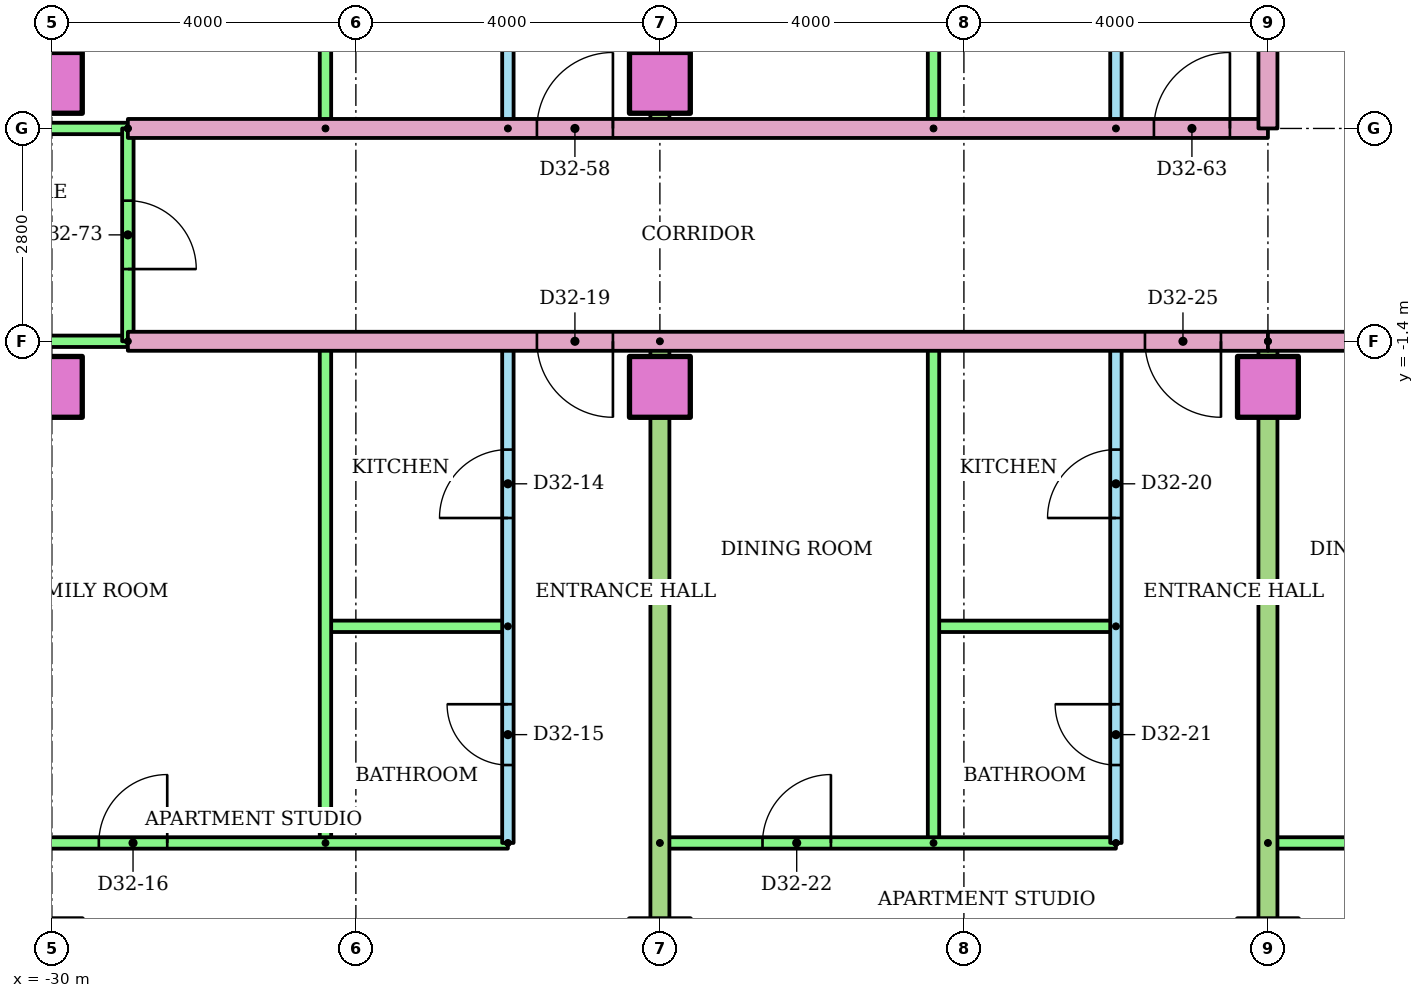
"""IFC4 building model, lengths in metres.
Left out: names, types, materials, properties, quantities, classifications, styles, units other than length and angle.
Written with IfcOpenShell. Run it as: python <this file> out.ifc"""

import sys

from ifc_helpers import new_model, si_unit, direction, frame, frame_2d, origin, origin_2d, place, context, subcontext, project, spatial, rectangle, extrude, element, fill, save


model = new_model("IFC4")
c1 = context("Model", 3, precision=1e-05, world=origin(), true_north=direction((0.0, 1.0)))
c2 = subcontext(c1, "Body", "Model", "MODEL_VIEW")
j1 = project(units=[si_unit("LENGTHUNIT", "METRE"), si_unit("PLANEANGLEUNIT", "RADIAN")], contexts=[c1])
p1 = place(None, origin())
s1 = spatial("IfcSite", under=j1, at=p1, CompositionType="ELEMENT")
p2 = place(p1, origin())
s2 = spatial("IfcBuilding", under=s1, at=p2, CompositionType="ELEMENT")
p3 = place(p2, frame((0.0, 0.0, 126.2)))
s3 = spatial("IfcBuildingStorey", under=s2, at=p3, CompositionType="ELEMENT", Elevation=126.2)
for number, where in (
    (1, (-30.0, -9.4, 0.0)),
    (2, (-22.0, -9.4, 0.0)),
    (3, (-14.0, -9.4, 0.0)),
    (4, (-30.0, -2.0, 0.0)),
    (5, (-22.0, -2.0, 0.0)),
    (6, (-14.0, -2.0, 0.0)),
    (7, (-30.0, 2.0, 0.0)),
    (8, (-22.0, 2.0, 0.0)),
):
    element("IfcColumn", number, at=place(p3, frame(where)), inside=s3, PredefinedType="COLUMN", context=c2, shape_type="SweptSolid", body=[
        extrude(rectangle(XDim=0.8, YDim=0.8, at=origin_2d()), origin(), (0.0, 0.0, 1.0), 3.2),
    ])
p4 = place(p3, frame((-24.0, -8.0, 0.0), z_axis=(0.0, 0.0, 1.0), x_axis=(0.0, 1.0, 0.0)))
e9 = element("IfcWall", 9, at=p4, inside=s3, PredefinedType="PARTITIONING", context=c2, shape_type="SweptSolid", body=[
    extrude(rectangle(XDim=6.6, YDim=0.15, at=frame_2d((3.3, 0.0))), origin(), (0.0, 0.0, 1.0), 2.4),
])
p5 = place(p4, frame((4.275, 0.0, 0.0)))
e10 = element("IfcOpeningElement", 10, at=p5, cuts=e9, PredefinedType="OPENING", context=c2, shape_type="SweptSolid", body=[
    extrude(rectangle(XDim=0.9, YDim=2.1, at=frame_2d((0.45, 1.05))), frame((0.0, 0.085, 0.0), z_axis=(0.0, -1.0, 0.0), x_axis=(1.0, 0.0, 0.0)), (0.0, 0.0, 1.0), 0.17),
])
p6 = place(p4, frame((1.025, 0.0, 0.0)))
e11 = element("IfcOpeningElement", 11, at=p6, cuts=e9, PredefinedType="OPENING", context=c2, shape_type="SweptSolid", body=[
    extrude(rectangle(XDim=0.8, YDim=2.1, at=frame_2d((0.4, 1.05))), frame((0.0, 0.085, 0.0), z_axis=(0.0, -1.0, 0.0), x_axis=(1.0, 0.0, 0.0)), (0.0, 0.0, 1.0), 0.17),
])
p7 = place(p3, frame((-24.0, -5.15, 0.0), z_axis=(0.0, 0.0, 1.0), x_axis=(-1.0, 0.0, 0.0)))
e12 = element("IfcWall", 12, at=p7, inside=s3, PredefinedType="PARTITIONING", context=c2, shape_type="SweptSolid", body=[
    extrude(rectangle(XDim=2.4, YDim=0.15, at=frame_2d((1.2, 0.0))), origin(), (0.0, 0.0, 1.0), 2.4),
])
p8 = place(p3, frame((-26.4, -8.0, 0.0), z_axis=(0.0, 0.0, 1.0), x_axis=(0.0, 1.0, 0.0)))
e13 = element("IfcWall", 13, at=p8, inside=s3, PredefinedType="PARTITIONING", context=c2, shape_type="SweptSolid", body=[
    extrude(rectangle(XDim=6.6, YDim=0.15, at=frame_2d((3.3, 0.0))), origin(), (0.0, 0.0, 1.0), 2.4),
])
p9 = place(p3, frame((-32.71, -8.0, 0.0)))
e14 = element("IfcWall", 14, at=p9, inside=s3, PredefinedType="PARTITIONING", context=c2, shape_type="SweptSolid", body=[
    extrude(rectangle(XDim=8.71, YDim=0.15, at=frame_2d((4.355, 0.0))), origin(), (0.0, 0.0, 1.0), 2.4),
])
p10 = place(p9, frame((3.328, 0.0, 0.0)))
e15 = element("IfcOpeningElement", 15, at=p10, cuts=e14, PredefinedType="OPENING", context=c2, shape_type="SweptSolid", body=[
    extrude(rectangle(XDim=0.9, YDim=2.1, at=frame_2d((0.45, 1.05))), frame((0.0, 0.085, 0.0), z_axis=(0.0, -1.0, 0.0), x_axis=(1.0, 0.0, 0.0)), (0.0, 0.0, 1.0), 0.17),
])
p11 = place(p3, frame((-16.0, -8.0, 0.0), z_axis=(0.0, 0.0, 1.0), x_axis=(0.0, 1.0, 0.0)))
e16 = element("IfcWall", 16, at=p11, inside=s3, PredefinedType="PARTITIONING", context=c2, shape_type="SweptSolid", body=[
    extrude(rectangle(XDim=6.6, YDim=0.15, at=frame_2d((3.3, 0.0))), origin(), (0.0, 0.0, 1.0), 2.4),
])
p12 = place(p11, frame((4.275, 0.0, 0.0)))
e17 = element("IfcOpeningElement", 17, at=p12, cuts=e16, PredefinedType="OPENING", context=c2, shape_type="SweptSolid", body=[
    extrude(rectangle(XDim=0.9, YDim=2.1, at=frame_2d((0.45, 1.05))), frame((0.0, 0.085, 0.0), z_axis=(0.0, -1.0, 0.0), x_axis=(1.0, 0.0, 0.0)), (0.0, 0.0, 1.0), 0.17),
])
p13 = place(p11, frame((1.025, 0.0, 0.0)))
e18 = element("IfcOpeningElement", 18, at=p13, cuts=e16, PredefinedType="OPENING", context=c2, shape_type="SweptSolid", body=[
    extrude(rectangle(XDim=0.8, YDim=2.1, at=frame_2d((0.4, 1.05))), frame((0.0, 0.085, 0.0), z_axis=(0.0, -1.0, 0.0), x_axis=(1.0, 0.0, 0.0)), (0.0, 0.0, 1.0), 0.17),
])
p14 = place(p3, frame((-16.0, -5.15, 0.0), z_axis=(0.0, 0.0, 1.0), x_axis=(-1.0, 0.0, 0.0)))
e19 = element("IfcWall", 19, at=p14, inside=s3, PredefinedType="PARTITIONING", context=c2, shape_type="SweptSolid", body=[
    extrude(rectangle(XDim=2.4, YDim=0.15, at=frame_2d((1.2, 0.0))), origin(), (0.0, 0.0, 1.0), 2.4),
])
p15 = place(p3, frame((-18.4, -8.0, 0.0), z_axis=(0.0, 0.0, 1.0), x_axis=(0.0, 1.0, 0.0)))
e20 = element("IfcWall", 20, at=p15, inside=s3, PredefinedType="PARTITIONING", context=c2, shape_type="SweptSolid", body=[
    extrude(rectangle(XDim=6.6, YDim=0.15, at=frame_2d((3.3, 0.0))), origin(), (0.0, 0.0, 1.0), 2.4),
])
p16 = place(p3, frame((-22.0, -8.0, 0.0)))
e21 = element("IfcWall", 21, at=p16, inside=s3, PredefinedType="PARTITIONING", context=c2, shape_type="SweptSolid", body=[
    extrude(rectangle(XDim=6.0, YDim=0.15, at=frame_2d((3.0, 0.0))), origin(), (0.0, 0.0, 1.0), 2.4),
])
p17 = place(p16, frame((1.35, 0.0, 0.0)))
e22 = element("IfcOpeningElement", 22, at=p17, cuts=e21, PredefinedType="OPENING", context=c2, shape_type="SweptSolid", body=[
    extrude(rectangle(XDim=0.9, YDim=2.1, at=frame_2d((0.45, 1.05))), frame((0.0, 0.085, 0.0), z_axis=(0.0, -1.0, 0.0), x_axis=(1.0, 0.0, 0.0)), (0.0, 0.0, 1.0), 0.17),
])
p18 = place(p3, frame((-22.0, -1.4, 0.0), z_axis=(0.0, 0.0, 1.0), x_axis=(0.0, -1.0, 0.0)))
e23 = element("IfcWall", 23, at=p18, inside=s3, PredefinedType="PARTITIONING", context=c2, shape_type="SweptSolid", body=[
    extrude(rectangle(XDim=14.91, YDim=0.25, at=frame_2d((7.455, 0.0))), origin(), (0.0, 0.0, 1.0), 2.4),
])
p19 = place(p3, frame((-14.0, -8.0, 0.0)))
e24 = element("IfcWall", 24, at=p19, inside=s3, PredefinedType="PARTITIONING", context=c2, shape_type="SweptSolid", body=[
    extrude(rectangle(XDim=14.0, YDim=0.15, at=frame_2d((7.0, 0.0))), origin(), (0.0, 0.0, 1.0), 2.4),
])
p20 = place(p19, frame((8.775, 0.0, 0.0)))
e25 = element("IfcOpeningElement", 25, at=p20, cuts=e24, PredefinedType="OPENING", context=c2, shape_type="SweptSolid", body=[
    extrude(rectangle(XDim=0.9, YDim=2.1, at=frame_2d((0.45, 1.05))), frame((0.0, 0.085, 0.0), z_axis=(0.0, -1.0, 0.0), x_axis=(1.0, 0.0, 0.0)), (0.0, 0.0, 1.0), 0.17),
])
p21 = place(p19, frame((4.525, 0.0, 0.0)))
e26 = element("IfcOpeningElement", 26, at=p21, cuts=e24, PredefinedType="OPENING", context=c2, shape_type="SweptSolid", body=[
    extrude(rectangle(XDim=0.9, YDim=2.1, at=frame_2d((0.45, 1.05))), frame((0.0, 0.085, 0.0), z_axis=(0.0, -1.0, 0.0), x_axis=(1.0, 0.0, 0.0)), (0.0, 0.0, 1.0), 0.17),
])
p22 = place(p19, frame((1.1, 0.0, 0.0)))
e27 = element("IfcOpeningElement", 27, at=p22, cuts=e24, PredefinedType="OPENING", context=c2, shape_type="SweptSolid", body=[
    extrude(rectangle(XDim=0.9, YDim=2.1, at=frame_2d((0.45, 1.05))), frame((0.0, 0.085, 0.0), z_axis=(0.0, -1.0, 0.0), x_axis=(1.0, 0.0, 0.0)), (0.0, 0.0, 1.0), 0.17),
])
p23 = place(p3, frame((-14.0, -1.4, 0.0), z_axis=(0.0, 0.0, 1.0), x_axis=(0.0, -1.0, 0.0)))
e28 = element("IfcWall", 28, at=p23, inside=s3, PredefinedType="PARTITIONING", context=c2, shape_type="SweptSolid", body=[
    extrude(rectangle(XDim=14.91, YDim=0.25, at=frame_2d((7.455, 0.0))), origin(), (0.0, 0.0, 1.0), 2.4),
])
p24 = place(p3, frame((-14.0, -1.4, 0.0), z_axis=(0.0, 0.0, 1.0), x_axis=(-1.0, 0.0, 0.0)))
e29 = element("IfcWall", 29, at=p24, inside=s3, PredefinedType="PARTITIONING", context=c2, shape_type="SweptSolid", body=[
    extrude(rectangle(XDim=15.0, YDim=0.25, at=frame_2d((7.5, 0.0))), origin(), (0.0, 0.0, 1.0), 2.4),
])
p25 = place(p24, frame((8.618, 0.0, 0.0)))
e30 = element("IfcOpeningElement", 30, at=p25, cuts=e29, PredefinedType="OPENING", context=c2, shape_type="SweptSolid", body=[
    extrude(rectangle(XDim=1.0, YDim=2.1, at=frame_2d((0.5, 1.05))), frame((0.0, 0.135, 0.0), z_axis=(0.0, -1.0, 0.0), x_axis=(1.0, 0.0, 0.0)), (0.0, 0.0, 1.0), 0.27),
])
p26 = place(p24, frame((0.618, 0.0, 0.0)))
e31 = element("IfcOpeningElement", 31, at=p26, cuts=e29, PredefinedType="OPENING", context=c2, shape_type="SweptSolid", body=[
    extrude(rectangle(XDim=1.0, YDim=2.1, at=frame_2d((0.5, 1.05))), frame((0.0, 0.135, 0.0), z_axis=(0.0, -1.0, 0.0), x_axis=(1.0, 0.0, 0.0)), (0.0, 0.0, 1.0), 0.27),
])
p27 = place(p3, frame((-29.0, -1.4, 0.0), z_axis=(0.0, 0.0, 1.0), x_axis=(-1.0, 0.0, 0.0)))
e32 = element("IfcWall", 32, at=p27, inside=s3, PredefinedType="PARTITIONING", context=c2, shape_type="SweptSolid", body=[
    extrude(rectangle(XDim=3.72, YDim=0.15, at=frame_2d((1.86, 0.0))), origin(), (0.0, 0.0, 1.0), 2.4),
])
p28 = place(p3, frame((-24.0, 1.4, 0.0), z_axis=(0.0, 0.0, 1.0), x_axis=(0.0, 1.0, 0.0)))
e33 = element("IfcWall", 33, at=p28, inside=s3, PredefinedType="PARTITIONING", context=c2, shape_type="SweptSolid", body=[
    extrude(rectangle(XDim=9.0, YDim=0.15, at=frame_2d((4.5, 0.0))), origin(), (0.0, 0.0, 1.0), 2.4),
])
p29 = place(p28, frame((2.05, 0.0, 0.0)))
e34 = element("IfcOpeningElement", 34, at=p29, cuts=e33, PredefinedType="OPENING", context=c2, shape_type="SweptSolid", body=[
    extrude(rectangle(XDim=0.9, YDim=2.1, at=frame_2d((0.45, 1.05))), frame((0.0, 0.085, 0.0), z_axis=(0.0, -1.0, 0.0), x_axis=(1.0, 0.0, 0.0)), (0.0, 0.0, 1.0), 0.17),
])
p30 = place(p28, frame((6.6, 0.0, 0.0)))
e35 = element("IfcOpeningElement", 35, at=p30, cuts=e33, PredefinedType="OPENING", context=c2, shape_type="SweptSolid", body=[
    extrude(rectangle(XDim=0.8, YDim=2.1, at=frame_2d((0.4, 1.05))), frame((0.0, 0.085, 0.0), z_axis=(0.0, -1.0, 0.0), x_axis=(1.0, 0.0, 0.0)), (0.0, 0.0, 1.0), 0.17),
])
p31 = place(p3, frame((-26.4, 1.4, 0.0), z_axis=(0.0, 0.0, 1.0), x_axis=(0.0, 1.0, 0.0)))
e36 = element("IfcWall", 36, at=p31, inside=s3, PredefinedType="PARTITIONING", context=c2, shape_type="SweptSolid", body=[
    extrude(rectangle(XDim=9.0, YDim=0.15, at=frame_2d((4.5, 0.0))), origin(), (0.0, 0.0, 1.0), 2.4),
])
p32 = place(p3, frame((-16.0, 1.4, 0.0), z_axis=(0.0, 0.0, 1.0), x_axis=(0.0, 1.0, 0.0)))
e37 = element("IfcWall", 37, at=p32, inside=s3, PredefinedType="PARTITIONING", context=c2, shape_type="SweptSolid", body=[
    extrude(rectangle(XDim=9.0, YDim=0.15, at=frame_2d((4.5, 0.0))), origin(), (0.0, 0.0, 1.0), 2.4),
])
p33 = place(p32, frame((2.05, 0.0, 0.0)))
e38 = element("IfcOpeningElement", 38, at=p33, cuts=e37, PredefinedType="OPENING", context=c2, shape_type="SweptSolid", body=[
    extrude(rectangle(XDim=0.9, YDim=2.1, at=frame_2d((0.45, 1.05))), frame((0.0, 0.085, 0.0), z_axis=(0.0, -1.0, 0.0), x_axis=(1.0, 0.0, 0.0)), (0.0, 0.0, 1.0), 0.17),
])
p34 = place(p32, frame((6.6, 0.0, 0.0)))
e39 = element("IfcOpeningElement", 39, at=p34, cuts=e37, PredefinedType="OPENING", context=c2, shape_type="SweptSolid", body=[
    extrude(rectangle(XDim=0.8, YDim=2.1, at=frame_2d((0.4, 1.05))), frame((0.0, 0.085, 0.0), z_axis=(0.0, -1.0, 0.0), x_axis=(1.0, 0.0, 0.0)), (0.0, 0.0, 1.0), 0.17),
])
p35 = place(p3, frame((-18.4, 1.4, 0.0), z_axis=(0.0, 0.0, 1.0), x_axis=(0.0, 1.0, 0.0)))
e40 = element("IfcWall", 40, at=p35, inside=s3, PredefinedType="PARTITIONING", context=c2, shape_type="SweptSolid", body=[
    extrude(rectangle(XDim=9.0, YDim=0.15, at=frame_2d((4.5, 0.0))), origin(), (0.0, 0.0, 1.0), 2.4),
])
p36 = place(p3, frame((-22.0, 18.721, 0.0), z_axis=(0.0, 0.0, 1.0), x_axis=(0.0, -1.0, 0.0)))
e41 = element("IfcWall", 41, at=p36, inside=s3, PredefinedType="PARTITIONING", context=c2, shape_type="SweptSolid", body=[
    extrude(rectangle(XDim=17.321, YDim=0.25, at=frame_2d((8.661, 0.0))), origin(), (0.0, 0.0, 1.0), 2.4),
])
p37 = place(p3, frame((-29.0, 1.4, 0.0)))
e42 = element("IfcWall", 42, at=p37, inside=s3, PredefinedType="PARTITIONING", context=c2, shape_type="SweptSolid", body=[
    extrude(rectangle(XDim=15.0, YDim=0.25, at=frame_2d((7.5, 0.0))), origin(), (0.0, 0.0, 1.0), 2.4),
])
p38 = place(p37, frame((5.382, 0.0, 0.0)))
e43 = element("IfcOpeningElement", 43, at=p38, cuts=e42, PredefinedType="OPENING", context=c2, shape_type="SweptSolid", body=[
    extrude(rectangle(XDim=1.0, YDim=2.1, at=frame_2d((0.5, 1.05))), frame((0.0, 0.135, 0.0), z_axis=(0.0, -1.0, 0.0), x_axis=(1.0, 0.0, 0.0)), (0.0, 0.0, 1.0), 0.27),
])
p39 = place(p37, frame((13.5, 0.0, 0.0)))
e44 = element("IfcOpeningElement", 44, at=p39, cuts=e42, PredefinedType="OPENING", context=c2, shape_type="SweptSolid", body=[
    extrude(rectangle(XDim=1.0, YDim=2.1, at=frame_2d((0.5, 1.05))), frame((0.0, 0.135, 0.0), z_axis=(0.0, -1.0, 0.0), x_axis=(1.0, 0.0, 0.0)), (0.0, 0.0, 1.0), 0.27),
])
p40 = place(p3, frame((-32.72, 1.4, 0.0)))
e45 = element("IfcWall", 45, at=p40, inside=s3, PredefinedType="PARTITIONING", context=c2, shape_type="SweptSolid", body=[
    extrude(rectangle(XDim=3.72, YDim=0.15, at=frame_2d((1.86, 0.0))), origin(), (0.0, 0.0, 1.0), 2.4),
])
p41 = place(p3, frame((-29.0, 1.4, 0.0), z_axis=(0.0, 0.0, 1.0), x_axis=(0.0, -1.0, 0.0)))
e46 = element("IfcWall", 46, at=p41, inside=s3, PredefinedType="PARTITIONING", context=c2, shape_type="SweptSolid", body=[
    extrude(rectangle(XDim=2.8, YDim=0.15, at=frame_2d((1.4, 0.0))), origin(), (0.0, 0.0, 1.0), 2.4),
])
p42 = place(p41, frame((0.95, 0.0, 0.0)))
e47 = element("IfcOpeningElement", 47, at=p42, cuts=e46, PredefinedType="OPENING", context=c2, shape_type="SweptSolid", body=[
    extrude(rectangle(XDim=0.9, YDim=2.1, at=frame_2d((0.45, 1.05))), frame((0.0, 0.085, 0.0), z_axis=(0.0, -1.0, 0.0), x_axis=(1.0, 0.0, 0.0)), (0.0, 0.0, 1.0), 0.17),
])
p43 = place(p3, frame((14.0, -1.4, 0.0), z_axis=(0.0, 0.0, 1.0), x_axis=(-1.0, 0.0, 0.0)))
e48 = element("IfcWall", 48, at=p43, inside=s3, PredefinedType="PARTITIONING", context=c2, shape_type="SweptSolid", body=[
    extrude(rectangle(XDim=28.0, YDim=0.25, at=frame_2d((14.0, 0.0))), origin(), (0.0, 0.0, 1.0), 2.4),
])
p44 = place(p43, frame((12.618, 0.0, 0.0)))
e49 = element("IfcOpeningElement", 49, at=p44, cuts=e48, PredefinedType="OPENING", context=c2, shape_type="SweptSolid", body=[
    extrude(rectangle(XDim=1.0, YDim=2.1, at=frame_2d((0.5, 1.05))), frame((0.0, 0.135, 0.0), z_axis=(0.0, -1.0, 0.0), x_axis=(1.0, 0.0, 0.0)), (0.0, 0.0, 1.0), 0.27),
])
p45 = place(p43, frame((10.382, 0.0, 0.0)))
e50 = element("IfcOpeningElement", 50, at=p45, cuts=e48, PredefinedType="OPENING", context=c2, shape_type="SweptSolid", body=[
    extrude(rectangle(XDim=1.0, YDim=2.1, at=frame_2d((0.5, 1.05))), frame((0.0, 0.135, 0.0), z_axis=(0.0, -1.0, 0.0), x_axis=(1.0, 0.0, 0.0)), (0.0, 0.0, 1.0), 0.27),
])
p46 = place(p3, frame((-14.0, 3.0, 0.0), z_axis=(0.0, 0.0, 1.0), x_axis=(0.0, -1.0, 0.0)))
e51 = element("IfcWall", 51, at=p46, inside=s3, PredefinedType="PARTITIONING", context=c2, shape_type="SweptSolid", body=[
    extrude(rectangle(XDim=1.6, YDim=0.25, at=frame_2d((0.8, 0.0))), origin(), (0.0, 0.0, 1.0), 2.4),
])
p47 = place(p5, origin())
e52 = element("IfcDoor", 52, at=p47, inside=s3, OperationType="SINGLE_SWING_LEFT", PredefinedType="DOOR", context=c2, shape_type="SweptSolid", body=[
    extrude(rectangle(XDim=0.9, YDim=2.1, at=frame_2d((0.45, 1.05))), frame((0.0, 0.025, 0.0), z_axis=(0.0, -1.0, 0.0), x_axis=(1.0, 0.0, 0.0)), (0.0, 0.0, 1.0), 0.05),
])
fill(e10, e52)
p48 = place(p6, origin())
e53 = element("IfcDoor", 53, at=p48, inside=s3, OperationType="SINGLE_SWING_RIGHT", PredefinedType="DOOR", context=c2, shape_type="SweptSolid", body=[
    extrude(rectangle(XDim=0.8, YDim=2.1, at=frame_2d((0.4, 1.05))), frame((0.0, 0.025, 0.0), z_axis=(0.0, -1.0, 0.0), x_axis=(1.0, 0.0, 0.0)), (0.0, 0.0, 1.0), 0.05),
])
fill(e11, e53)
p49 = place(p10, origin())
e54 = element("IfcDoor", 54, at=p49, inside=s3, OperationType="SINGLE_SWING_RIGHT", PredefinedType="DOOR", context=c2, shape_type="SweptSolid", body=[
    extrude(rectangle(XDim=0.9, YDim=2.1, at=frame_2d((0.45, 1.05))), frame((0.0, 0.025, 0.0), z_axis=(0.0, -1.0, 0.0), x_axis=(1.0, 0.0, 0.0)), (0.0, 0.0, 1.0), 0.05),
])
fill(e15, e54)
p50 = place(p25, origin())
e55 = element("IfcDoor", 55, at=p50, inside=s3, OperationType="SINGLE_SWING_LEFT", PredefinedType="DOOR", context=c2, shape_type="SweptSolid", body=[
    extrude(rectangle(XDim=1.0, YDim=2.1, at=frame_2d((0.5, 1.05))), frame((0.0, 0.025, 0.0), z_axis=(0.0, -1.0, 0.0), x_axis=(1.0, 0.0, 0.0)), (0.0, 0.0, 1.0), 0.05),
])
fill(e30, e55)
p51 = place(p12, origin())
e56 = element("IfcDoor", 56, at=p51, inside=s3, OperationType="SINGLE_SWING_LEFT", PredefinedType="DOOR", context=c2, shape_type="SweptSolid", body=[
    extrude(rectangle(XDim=0.9, YDim=2.1, at=frame_2d((0.45, 1.05))), frame((0.0, 0.025, 0.0), z_axis=(0.0, -1.0, 0.0), x_axis=(1.0, 0.0, 0.0)), (0.0, 0.0, 1.0), 0.05),
])
fill(e17, e56)
p52 = place(p13, origin())
e57 = element("IfcDoor", 57, at=p52, inside=s3, OperationType="SINGLE_SWING_RIGHT", PredefinedType="DOOR", context=c2, shape_type="SweptSolid", body=[
    extrude(rectangle(XDim=0.8, YDim=2.1, at=frame_2d((0.4, 1.05))), frame((0.0, 0.025, 0.0), z_axis=(0.0, -1.0, 0.0), x_axis=(1.0, 0.0, 0.0)), (0.0, 0.0, 1.0), 0.05),
])
fill(e18, e57)
p53 = place(p17, origin())
e58 = element("IfcDoor", 58, at=p53, inside=s3, OperationType="SINGLE_SWING_RIGHT", PredefinedType="DOOR", context=c2, shape_type="SweptSolid", body=[
    extrude(rectangle(XDim=0.9, YDim=2.1, at=frame_2d((0.45, 1.05))), frame((0.0, 0.025, 0.0), z_axis=(0.0, -1.0, 0.0), x_axis=(1.0, 0.0, 0.0)), (0.0, 0.0, 1.0), 0.05),
])
fill(e22, e58)
p54 = place(p26, origin())
e59 = element("IfcDoor", 59, at=p54, inside=s3, OperationType="SINGLE_SWING_LEFT", PredefinedType="DOOR", context=c2, shape_type="SweptSolid", body=[
    extrude(rectangle(XDim=1.0, YDim=2.1, at=frame_2d((0.5, 1.05))), frame((0.0, 0.025, 0.0), z_axis=(0.0, -1.0, 0.0), x_axis=(1.0, 0.0, 0.0)), (0.0, 0.0, 1.0), 0.05),
])
fill(e31, e59)
p55 = place(p38, origin())
e60 = element("IfcDoor", 60, at=p55, inside=s3, OperationType="SINGLE_SWING_RIGHT", PredefinedType="DOOR", context=c2, shape_type="SweptSolid", body=[
    extrude(rectangle(XDim=1.0, YDim=2.1, at=frame_2d((0.5, 1.05))), frame((0.0, 0.025, 0.0), z_axis=(0.0, -1.0, 0.0), x_axis=(1.0, 0.0, 0.0)), (0.0, 0.0, 1.0), 0.05),
])
fill(e43, e60)
p56 = place(p39, origin())
e61 = element("IfcDoor", 61, at=p56, inside=s3, OperationType="SINGLE_SWING_RIGHT", PredefinedType="DOOR", context=c2, shape_type="SweptSolid", body=[
    extrude(rectangle(XDim=1.0, YDim=2.1, at=frame_2d((0.5, 1.05))), frame((0.0, 0.025, 0.0), z_axis=(0.0, -1.0, 0.0), x_axis=(1.0, 0.0, 0.0)), (0.0, 0.0, 1.0), 0.05),
])
fill(e44, e61)
p57 = place(p42, origin())
e62 = element("IfcDoor", 62, at=p57, inside=s3, OperationType="SINGLE_SWING_RIGHT", PredefinedType="DOOR", context=c2, shape_type="SweptSolid", body=[
    extrude(rectangle(XDim=0.9, YDim=2.1, at=frame_2d((0.45, 1.05))), frame((0.0, 0.025, 0.0), z_axis=(0.0, -1.0, 0.0), x_axis=(1.0, 0.0, 0.0)), (0.0, 0.0, 1.0), 0.05),
])
fill(e47, e62)
save(model, sys.argv[1])
